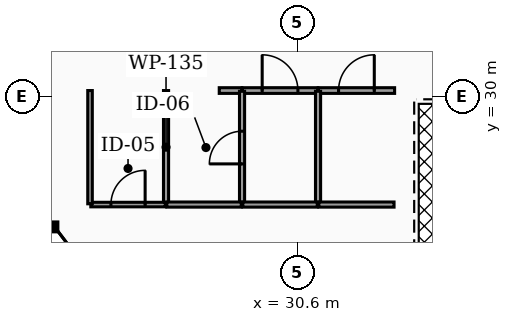
"""IFC4 building model, lengths in metres.
Left out: names, types, materials, properties, quantities, classifications, styles, units other than length and angle.
Written with IfcOpenShell. Run it as: python <this file> out.ifc"""

import sys

from ifc_helpers import new_model, si_unit, direction, frame, frame_2d, origin, origin_2d, place, context, subcontext, project, spatial, rectangle, hollow_rectangle, extrude, element, fill, save


model = new_model("IFC4")
c1 = context("Model", 3, precision=1e-05, world=origin(), true_north=direction((0.0, 1.0)))
c2 = subcontext(c1, "Body", "Model", "MODEL_VIEW")
j1 = project(units=[si_unit("LENGTHUNIT", "METRE"), si_unit("PLANEANGLEUNIT", "RADIAN")], contexts=[c1])
p1 = place(None, origin())
s1 = spatial("IfcSite", under=j1, at=p1, CompositionType="ELEMENT")
p2 = place(p1, origin())
s2 = spatial("IfcBuilding", under=s1, at=p2, CompositionType="ELEMENT")
p3 = place(p2, frame((0.0, 0.0, 183.26)))
s3 = spatial("IfcBuildingStorey", under=s2, at=p3, CompositionType="ELEMENT", Elevation=183.26)
p4 = place(p3, frame((23.65, 28.388, 0.0), z_axis=(0.050465829939, 0.066245090815, 0.996526360891), x_axis=(-0.795470040439, 0.605992916431, 0.0)))
e1 = element("IfcColumn", 1, at=p4, inside=s3, PredefinedType="COLUMN", context=c2, shape_type="SweptSolid", body=[
    extrude(hollow_rectangle(XDim=0.7, YDim=0.7, WallThickness=0.035, at=origin_2d()), origin(), (0.0, 0.0, 1.0), 3.512),
])
p5 = place(p3, frame((28.55, 30.15, 0.0), z_axis=(0.0, 0.0, 1.0), x_axis=(1.0, 0.0, 0.0)))
e2 = element("IfcWall", 2, at=p5, inside=s3, PredefinedType="PARTITIONING", context=c2, shape_type="SweptSolid", body=[
    extrude(rectangle(XDim=0.595, YDim=0.15, at=frame_2d((0.297, 0.0))), origin(), (0.0, 0.0, 1.0), 2.457),
])
p6 = place(p3, frame((29.155, 30.15, 0.0), z_axis=(0.0, 0.0, 1.0), x_axis=(1.0, 0.0, 0.0)))
e3 = element("IfcWall", 3, at=p6, inside=s3, PredefinedType="PARTITIONING", context=c2, shape_type="SweptSolid", body=[
    extrude(rectangle(XDim=1.99, YDim=0.15, at=frame_2d((0.995, 0.0))), origin(), (0.0, 0.0, 1.0), 2.457),
])
p7 = place(p6, frame((0.525, 0.0, 0.0)))
e4 = element("IfcOpeningElement", 4, at=p7, cuts=e3, PredefinedType="OPENING", context=c2, shape_type="SweptSolid", body=[
    extrude(rectangle(XDim=0.94, YDim=2.05, at=frame_2d((0.47, 1.025))), frame((0.0, 0.085, 0.0), z_axis=(0.0, -1.0, 0.0), x_axis=(1.0, 0.0, 0.0)), (0.0, 0.0, 1.0), 0.17),
])
p8 = place(p3, frame((31.155, 30.15, 0.0), z_axis=(0.0, 0.0, 1.0), x_axis=(1.0, 0.0, 0.0)))
e5 = element("IfcWall", 5, at=p8, inside=s3, PredefinedType="PARTITIONING", context=c2, shape_type="SweptSolid", body=[
    extrude(rectangle(XDim=2.01, YDim=0.15, at=frame_2d((1.005, 0.0))), origin(), (0.0, 0.0, 1.0), 2.457),
])
p9 = place(p8, frame((0.535, 0.0, 0.0)))
e6 = element("IfcOpeningElement", 6, at=p9, cuts=e5, PredefinedType="OPENING", context=c2, shape_type="SweptSolid", body=[
    extrude(rectangle(XDim=0.94, YDim=2.05, at=frame_2d((0.47, 1.025))), frame((0.0, 0.085, 0.0), z_axis=(0.0, -1.0, 0.0), x_axis=(1.0, 0.0, 0.0)), (0.0, 0.0, 1.0), 0.17),
])
p10 = place(p3, frame((27.15, 27.17, 0.0), z_axis=(0.0, 0.0, 1.0), x_axis=(0.0, 1.0, 0.0)))
e7 = element("IfcWall", 7, at=p10, inside=s3, PredefinedType="PARTITIONING", context=c2, shape_type="SweptSolid", body=[
    extrude(rectangle(XDim=2.98, YDim=0.135, at=frame_2d((1.49, 0.0))), origin(), (0.0, 0.0, 1.0), 2.457),
])
p11 = place(p3, frame((25.17, 27.15, 0.0), z_axis=(0.0, 0.0, 1.0), x_axis=(1.0, 0.0, 0.0)))
e8 = element("IfcWall", 8, at=p11, inside=s3, PredefinedType="PARTITIONING", context=c2, shape_type="SweptSolid", body=[
    extrude(rectangle(XDim=1.96, YDim=0.12, at=frame_2d((0.98, 0.0))), origin(), (0.0, 0.0, 1.0), 2.457),
])
p12 = place(p11, frame((0.53, 0.0, 0.0)))
e9 = element("IfcOpeningElement", 9, at=p12, cuts=e8, PredefinedType="OPENING", context=c2, shape_type="SweptSolid", body=[
    extrude(rectangle(XDim=0.9, YDim=2.05, at=frame_2d((0.45, 1.025))), frame((0.0, 0.07, 0.0), z_axis=(0.0, -1.0, 0.0), x_axis=(1.0, 0.0, 0.0)), (0.0, 0.0, 1.0), 0.14),
])
p13 = place(p3, frame((25.15, 27.17, 0.0), z_axis=(0.0, 0.0, 1.0), x_axis=(0.0, 1.0, 0.0)))
e10 = element("IfcWall", 10, at=p13, inside=s3, PredefinedType="PARTITIONING", context=c2, shape_type="SweptSolid", body=[
    extrude(rectangle(XDim=2.98, YDim=0.12, at=frame_2d((1.49, 0.0))), origin(), (0.0, 0.0, 1.0), 2.457),
])
p14 = place(p3, frame((29.15, 27.17, 0.0), z_axis=(0.0, 0.0, 1.0), x_axis=(0.0, 1.0, 0.0)))
e11 = element("IfcWall", 11, at=p14, inside=s3, PredefinedType="PARTITIONING", context=c2, shape_type="SweptSolid", body=[
    extrude(rectangle(XDim=2.96, YDim=0.135, at=frame_2d((1.48, 0.0))), origin(), (0.0, 0.0, 1.0), 2.457),
])
p15 = place(p14, frame((1.05, 0.0, 0.0)))
e12 = element("IfcOpeningElement", 12, at=p15, cuts=e11, PredefinedType="OPENING", context=c2, shape_type="SweptSolid", body=[
    extrude(rectangle(XDim=0.86, YDim=2.05, at=frame_2d((0.43, 1.025))), frame((0.0, 0.077, 0.0), z_axis=(0.0, -1.0, 0.0), x_axis=(1.0, 0.0, 0.0)), (0.0, 0.0, 1.0), 0.155),
])
p16 = place(p3, frame((27.17, 27.15, 0.0), z_axis=(0.0, 0.0, 1.0), x_axis=(1.0, 0.0, 0.0)))
e13 = element("IfcWall", 13, at=p16, inside=s3, PredefinedType="PARTITIONING", context=c2, shape_type="SweptSolid", body=[
    extrude(rectangle(XDim=1.96, YDim=0.135, at=frame_2d((0.98, 0.0))), origin(), (0.0, 0.0, 1.0), 2.457),
])
p17 = place(p3, frame((31.15, 27.17, 0.0), z_axis=(0.0, 0.0, 1.0), x_axis=(0.0, 1.0, 0.0)))
e14 = element("IfcWall", 14, at=p17, inside=s3, PredefinedType="PARTITIONING", context=c2, shape_type="SweptSolid", body=[
    extrude(rectangle(XDim=2.96, YDim=0.135, at=frame_2d((1.48, 0.0))), origin(), (0.0, 0.0, 1.0), 2.457),
])
p18 = place(p3, frame((29.17, 27.15, 0.0), z_axis=(0.0, 0.0, 1.0), x_axis=(1.0, 0.0, 0.0)))
e15 = element("IfcWall", 15, at=p18, inside=s3, PredefinedType="PARTITIONING", context=c2, shape_type="SweptSolid", body=[
    extrude(rectangle(XDim=1.96, YDim=0.135, at=frame_2d((0.98, 0.0))), origin(), (0.0, 0.0, 1.0), 2.457),
])
p19 = place(p3, frame((31.17, 27.15, 0.0), z_axis=(0.0, 0.0, 1.0), x_axis=(1.0, 0.0, 0.0)))
e16 = element("IfcWall", 16, at=p19, inside=s3, PredefinedType="PARTITIONING", context=c2, shape_type="SweptSolid", body=[
    extrude(rectangle(XDim=1.98, YDim=0.135, at=frame_2d((0.99, 0.0))), origin(), (0.0, 0.0, 1.0), 2.457),
])
p20 = place(p7, origin())
e17 = element("IfcDoor", 17, at=p20, inside=s3, OperationType="SINGLE_SWING_LEFT", PredefinedType="DOOR", context=c2, shape_type="SweptSolid", body=[
    extrude(rectangle(XDim=0.94, YDim=2.05, at=frame_2d((0.47, 1.025))), frame((0.0, 0.025, 0.0), z_axis=(0.0, -1.0, 0.0), x_axis=(1.0, 0.0, 0.0)), (0.0, 0.0, 1.0), 0.05),
])
fill(e4, e17)
p21 = place(p9, origin())
e18 = element("IfcDoor", 18, at=p21, inside=s3, OperationType="SINGLE_SWING_RIGHT", PredefinedType="DOOR", context=c2, shape_type="SweptSolid", body=[
    extrude(rectangle(XDim=0.94, YDim=2.05, at=frame_2d((0.47, 1.025))), frame((0.0, 0.025, 0.0), z_axis=(0.0, -1.0, 0.0), x_axis=(1.0, 0.0, 0.0)), (0.0, 0.0, 1.0), 0.05),
])
fill(e6, e18)
p22 = place(p12, origin())
e19 = element("IfcDoor", 19, at=p22, inside=s3, OperationType="SINGLE_SWING_RIGHT", PredefinedType="DOOR", context=c2, shape_type="SweptSolid", body=[
    extrude(rectangle(XDim=0.9, YDim=2.05, at=frame_2d((0.45, 1.025))), frame((0.0, 0.025, 0.0), z_axis=(0.0, -1.0, 0.0), x_axis=(1.0, 0.0, 0.0)), (0.0, 0.0, 1.0), 0.05),
])
fill(e9, e19)
p23 = place(p15, origin())
e20 = element("IfcDoor", 20, at=p23, inside=s3, OperationType="SINGLE_SWING_LEFT", PredefinedType="DOOR", context=c2, shape_type="SweptSolid", body=[
    extrude(rectangle(XDim=0.86, YDim=2.05, at=frame_2d((0.43, 1.025))), frame((0.0, 0.025, 0.0), z_axis=(0.0, -1.0, 0.0), x_axis=(1.0, 0.0, 0.0)), (0.0, 0.0, 1.0), 0.05),
])
fill(e12, e20)
save(model, sys.argv[1])
